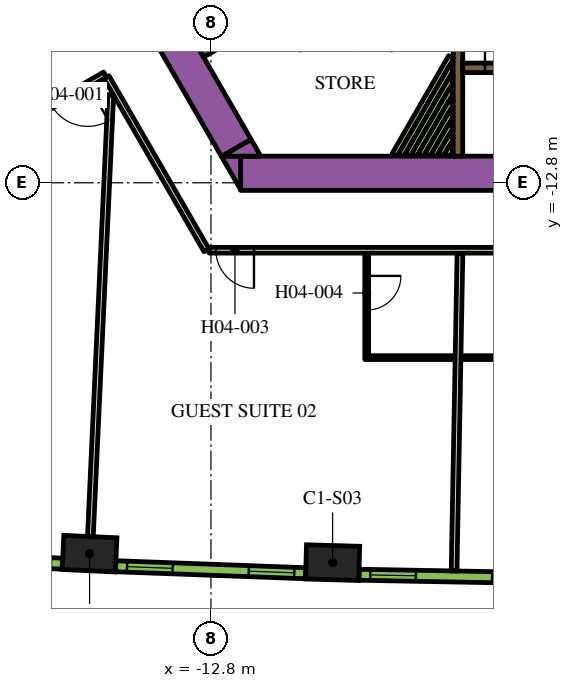
"""IFC4 building model, lengths in metres.
Left out: names, types, materials, properties, quantities, classifications, styles, units other than length and angle.
Written with IfcOpenShell. Run it as: python <this file> out.ifc"""

import sys

from ifc_helpers import new_model, si_unit, direction, frame, frame_2d, origin, origin_2d, place, context, subcontext, project, spatial, polyline, rectangle, outline, extrude, element, fill, save


model = new_model("IFC4")
c1 = context("Model", 3, precision=1e-05, world=origin(), true_north=direction((0.0, 1.0)))
c2 = subcontext(c1, "Body", "Model", "MODEL_VIEW")
j1 = project(units=[si_unit("LENGTHUNIT", "METRE"), si_unit("PLANEANGLEUNIT", "RADIAN")], contexts=[c1])
p1 = place(None, origin())
s1 = spatial("IfcSite", under=j1, at=p1, CompositionType="ELEMENT")
p2 = place(p1, origin())
s2 = spatial("IfcBuilding", under=s1, at=p2, CompositionType="ELEMENT")
p3 = place(p2, frame((0.0, 0.0, 66.6)))
s3 = spatial("IfcBuildingStorey", under=s2, at=p3, CompositionType="ELEMENT", Elevation=66.6)
for number, where, z_axis, x_axis in (
    (1, (-15.994, -22.558, 0.0), (0.0, 0.0, 1.0), (0.999, -0.046, 0.0)),
    (2, (-9.599, -22.795, 0.0), (0.0, 0.0, 1.0), (1.0, -0.028, 0.0)),
):
    element("IfcColumn", number, at=place(p3, frame(where, z_axis=z_axis, x_axis=x_axis)), inside=s3, PredefinedType="COLUMN", context=c2, shape_type="SweptSolid", body=[
        extrude(rectangle(XDim=1.4, YDim=0.9, at=origin_2d()), origin(), (0.0, 0.0, 1.0), 3.9),
    ])
p4 = place(p3, frame((-12.019, -12.55, 0.0), z_axis=(0.0, 0.0, 1.0), x_axis=(1.0, 0.0, 0.0)))
e3 = element("IfcWall", 3, at=p4, inside=s3, PredefinedType="SOLIDWALL", context=c2, shape_type="SweptSolid", body=[
    extrude(rectangle(XDim=21.63, YDim=0.9, at=frame_2d((10.815, 0.0))), origin(), (0.0, 0.0, 1.0), 3.9),
])
p5 = place(p3, origin())
e4 = element("IfcWall", 4, at=p5, inside=s3, PredefinedType="SOLIDWALL", context=c2, shape_type="SweptSolid", body=[
    extrude(outline(polyline([(-12.529, -12.1), (-12.021, -12.1), (-12.021, -12.98), (-12.529, -12.1)])), origin(), (0.0, 0.0, 1.0), 3.9),
])
p6 = place(p3, frame((-12.134, -11.883, 0.0), z_axis=(0.0, 0.0, 1.0), x_axis=(-0.500005339912, 0.866022320763, 0.0)))
e5 = element("IfcWall", 5, at=p6, inside=s3, PredefinedType="SOLIDWALL", context=c2, shape_type="SweptSolid", body=[
    extrude(rectangle(XDim=9.488, YDim=0.9, at=frame_2d((4.744, 0.0))), origin(), (0.0, 0.0, 1.0), 3.9),
])
e6 = element("IfcWall", 6, at=p5, inside=s3, PredefinedType="SOLIDWALL", context=c2, shape_type="SweptSolid", body=[
    extrude(outline(polyline([(-11.489, -12.1), (-12.505, -12.1), (-11.743, -11.66), (-11.489, -12.1)])), origin(), (0.0, 0.0, 1.0), 3.9),
])
p7 = place(p3, frame((-12.885, -9.431, 0.0), z_axis=(0.0, 0.0, 1.0), x_axis=(-0.500020560727, 0.866013532718, 0.0)))
e7 = element("IfcWall", 7, at=p7, inside=s3, PredefinedType="SOLIDWALL", context=c2, shape_type="SweptSolid", body=[
    extrude(rectangle(XDim=3.45, YDim=0.25, at=frame_2d((1.725, 0.0))), origin(), (0.0, 0.0, 1.0), 3.9),
])
p8 = place(p3, frame((-12.84, -9.261, 0.0), z_axis=(0.0, 0.0, 1.0), x_axis=(0.866016039709, 0.500016218704, 0.0)))
e8 = element("IfcWall", 8, at=p8, inside=s3, PredefinedType="SOLIDWALL", context=c2, shape_type="SweptSolid", body=[
    extrude(rectangle(XDim=7.05, YDim=0.25, at=frame_2d((3.525, 0.0))), origin(), (0.0, 0.0, 1.0), 3.9),
])
p9 = place(p3, frame((-6.3, -12.1, 0.0), z_axis=(0.0, 0.0, 1.0), x_axis=(0.0, 1.0, 0.0)))
e9 = element("IfcWall", 9, at=p9, inside=s3, PredefinedType="SOLIDWALL", context=c2, shape_type="SweptSolid", body=[
    extrude(rectangle(XDim=3.265, YDim=0.25, at=frame_2d((1.632, 0.0))), origin(), (0.0, 0.0, 1.0), 3.9),
])
p10 = place(p3, frame((-7.968, -12.068, 0.0), z_axis=(0.0, 0.0, 1.0), x_axis=(0.500013701029, 0.866017493347, 0.0)))
e10 = element("IfcWall", 10, at=p10, inside=s3, PredefinedType="PARTITIONING", context=c2, shape_type="SweptSolid", body=[
    extrude(rectangle(XDim=2.975, YDim=0.15, at=frame_2d((1.488, 0.0))), origin(), (0.0, 0.0, 1.0), 2.75),
])
p11 = place(p3, frame((-7.794, -12.068, 0.0), z_axis=(0.0, 0.0, 1.0), x_axis=(0.499985098601, 0.86603400694, 0.0)))
e11 = element("IfcWall", 11, at=p11, inside=s3, PredefinedType="PARTITIONING", context=c2, shape_type="SweptSolid", body=[
    extrude(rectangle(XDim=2.628, YDim=0.15, at=frame_2d((1.314, 0.0))), origin(), (0.0, 0.0, 1.0), 2.75),
])
p12 = place(p3, frame((-7.621, -12.068, 0.0), z_axis=(0.0, 0.0, 1.0), x_axis=(0.500028047758, 0.866009209798, 0.0)))
e12 = element("IfcWall", 12, at=p12, inside=s3, PredefinedType="PARTITIONING", context=c2, shape_type="SweptSolid", body=[
    extrude(rectangle(XDim=2.282, YDim=0.15, at=frame_2d((1.141, 0.0))), origin(), (0.0, 0.0, 1.0), 2.75),
])
p13 = place(p3, frame((-7.448, -12.068, 0.0), z_axis=(0.0, 0.0, 1.0), x_axis=(0.500031751504, 0.866007071269, 0.0)))
e13 = element("IfcWall", 13, at=p13, inside=s3, PredefinedType="PARTITIONING", context=c2, shape_type="SweptSolid", body=[
    extrude(rectangle(XDim=1.936, YDim=0.15, at=frame_2d((0.968, 0.0))), origin(), (0.0, 0.0, 1.0), 2.75),
])
p14 = place(p3, frame((-7.275, -12.068, 0.0), z_axis=(0.0, 0.0, 1.0), x_axis=(0.499988385283, 0.86603210944, 0.0)))
e14 = element("IfcWall", 14, at=p14, inside=s3, PredefinedType="PARTITIONING", context=c2, shape_type="SweptSolid", body=[
    extrude(rectangle(XDim=1.589, YDim=0.15, at=frame_2d((0.795, 0.0))), origin(), (0.0, 0.0, 1.0), 2.75),
])
p15 = place(p3, frame((-7.102, -12.068, 0.0), z_axis=(0.0, 0.0, 1.0), x_axis=(0.500068153333, 0.865986051864, 0.0)))
e15 = element("IfcWall", 15, at=p15, inside=s3, PredefinedType="PARTITIONING", context=c2, shape_type="SweptSolid", body=[
    extrude(rectangle(XDim=1.243, YDim=0.15, at=frame_2d((0.622, 0.0))), origin(), (0.0, 0.0, 1.0), 2.75),
])
p16 = place(p3, frame((-6.928, -12.068, 0.0), z_axis=(0.0, 0.0, 1.0), x_axis=(0.500005339912, 0.866022320763, 0.0)))
e16 = element("IfcWall", 16, at=p16, inside=s3, PredefinedType="PARTITIONING", context=c2, shape_type="SweptSolid", body=[
    extrude(rectangle(XDim=0.896, YDim=0.15, at=frame_2d((0.448, 0.0))), origin(), (0.0, 0.0, 1.0), 2.75),
])
p17 = place(p3, frame((-6.755, -12.068, 0.0), z_axis=(0.0, 0.0, 1.0), x_axis=(0.500196256984, 0.865912065108, 0.0)))
e17 = element("IfcWall", 17, at=p17, inside=s3, PredefinedType="PARTITIONING", context=c2, shape_type="SweptSolid", body=[
    extrude(rectangle(XDim=0.55, YDim=0.15, at=frame_2d((0.275, 0.0))), origin(), (0.0, 0.0, 1.0), 2.75),
])
p18 = place(p3, frame((-6.582, -12.068, 0.0), z_axis=(0.0, 0.0, 1.0), x_axis=(0.499618727529, 0.866245419672, 0.0)))
e18 = element("IfcWall", 18, at=p18, inside=s3, PredefinedType="PARTITIONING", context=c2, shape_type="SweptSolid", body=[
    extrude(rectangle(XDim=0.204, YDim=0.15, at=frame_2d((0.102, 0.0))), origin(), (0.0, 0.0, 1.0), 2.75),
])
p19 = place(p3, frame((-6.175, -9.775, 0.0), z_axis=(0.0, 0.0, 1.0), x_axis=(1.0, 0.0, 0.0)))
e19 = element("IfcWall", 19, at=p19, inside=s3, PredefinedType="SOLIDWALL", context=c2, shape_type="SweptSolid", body=[
    extrude(rectangle(XDim=12.35, YDim=0.25, at=frame_2d((6.175, 0.0))), origin(), (0.0, 0.0, 1.0), 3.9),
])
p20 = place(p19, frame((0.585, 0.0, 0.0)))
e20 = element("IfcOpeningElement", 20, at=p20, cuts=e19, PredefinedType="OPENING", context=c2, shape_type="SweptSolid", body=[
    extrude(rectangle(XDim=1.1, YDim=2.1, at=frame_2d((0.55, 1.05))), frame((0.0, 0.135, 0.0), z_axis=(0.0, -1.0, 0.0), x_axis=(1.0, 0.0, 0.0)), (0.0, 0.0, 1.0), 0.27),
])
p21 = place(p19, frame((3.105, 0.0, 0.0)))
e21 = element("IfcOpeningElement", 21, at=p21, cuts=e19, PredefinedType="OPENING", context=c2, shape_type="SweptSolid", body=[
    extrude(rectangle(XDim=1.1, YDim=2.1, at=frame_2d((0.55, 1.05))), frame((0.0, 0.135, 0.0), z_axis=(0.0, -1.0, 0.0), x_axis=(1.0, 0.0, 0.0)), (0.0, 0.0, 1.0), 0.27),
])
p22 = place(p19, frame((5.625, 0.0, 0.0)))
e22 = element("IfcOpeningElement", 22, at=p22, cuts=e19, PredefinedType="OPENING", context=c2, shape_type="SweptSolid", body=[
    extrude(rectangle(XDim=1.1, YDim=2.1, at=frame_2d((0.55, 1.05))), frame((0.0, 0.135, 0.0), z_axis=(0.0, -1.0, 0.0), x_axis=(1.0, 0.0, 0.0)), (0.0, 0.0, 1.0), 0.27),
])
p23 = place(p19, frame((8.145, 0.0, 0.0)))
e23 = element("IfcOpeningElement", 23, at=p23, cuts=e19, PredefinedType="OPENING", context=c2, shape_type="SweptSolid", body=[
    extrude(rectangle(XDim=1.1, YDim=2.1, at=frame_2d((0.55, 1.05))), frame((0.0, 0.135, 0.0), z_axis=(0.0, -1.0, 0.0), x_axis=(1.0, 0.0, 0.0)), (0.0, 0.0, 1.0), 0.27),
])
p24 = place(p19, frame((10.665, 0.0, 0.0)))
e24 = element("IfcOpeningElement", 24, at=p24, cuts=e19, PredefinedType="OPENING", context=c2, shape_type="SweptSolid", body=[
    extrude(rectangle(XDim=1.1, YDim=2.1, at=frame_2d((0.55, 1.05))), frame((0.0, 0.135, 0.0), z_axis=(0.0, -1.0, 0.0), x_axis=(1.0, 0.0, 0.0)), (0.0, 0.0, 1.0), 0.27),
])
p25 = place(p3, frame((-30.463, -16.635, 0.0), z_axis=(0.0, 0.0, 1.0), x_axis=(0.866022394896, 0.500005211512, 0.0)))
e25 = element("IfcWall", 25, at=p25, inside=s3, PredefinedType="PARTITIONING", context=c2, shape_type="SweptSolid", body=[
    extrude(rectangle(XDim=16.144, YDim=0.15, at=frame_2d((8.072, 0.0))), origin(), (0.0, 0.0, 1.0), 2.75),
])
p26 = place(p25, frame((11.004, 0.0, 0.0)))
e26 = element("IfcOpeningElement", 26, at=p26, cuts=e25, PredefinedType="OPENING", context=c2, shape_type="SweptSolid", body=[
    extrude(rectangle(XDim=1.0, YDim=2.1, at=frame_2d((0.5, 1.05))), frame((0.0, 0.085, 0.0), z_axis=(0.0, -1.0, 0.0), x_axis=(1.0, 0.0, 0.0)), (0.0, 0.0, 1.0), 0.17),
])
p27 = place(p3, frame((-15.587, -9.952, 0.0), z_axis=(0.0, 0.0, 1.0), x_axis=(-0.866022197818, -0.500005552856, 0.0)))
e27 = element("IfcWall", 27, at=p27, inside=s3, PredefinedType="PARTITIONING", context=c2, shape_type="SweptSolid", body=[
    extrude(rectangle(XDim=16.224, YDim=0.15, at=frame_2d((8.112, 0.0))), origin(), (0.0, 0.0, 1.0), 2.75),
])
p28 = place(p27, frame((0.527, 0.0, 0.0)))
e28 = element("IfcOpeningElement", 28, at=p28, cuts=e27, PredefinedType="OPENING", context=c2, shape_type="SweptSolid", body=[
    extrude(rectangle(XDim=1.1, YDim=2.1, at=frame_2d((0.55, 1.05))), frame((0.0, 0.085, 0.0), z_axis=(0.0, -1.0, 0.0), x_axis=(1.0, 0.0, 0.0)), (0.0, 0.0, 1.0), 0.17),
])
p29 = place(p3, frame((-12.918, -14.575, 0.0), z_axis=(0.0, 0.0, 1.0), x_axis=(-0.500009150678, 0.866020120573, 0.0)))
e29 = element("IfcWall", 29, at=p29, inside=s3, PredefinedType="PARTITIONING", context=c2, shape_type="SweptSolid", body=[
    extrude(rectangle(XDim=5.258, YDim=0.15, at=frame_2d((2.629, 0.0))), origin(), (0.0, 0.0, 1.0), 2.75),
])
p30 = place(p3, frame((12.918, -14.575, 0.0), z_axis=(0.0, 0.0, 1.0), x_axis=(-1.0, 0.0, 0.0)))
e30 = element("IfcWall", 30, at=p30, inside=s3, PredefinedType="PARTITIONING", context=c2, shape_type="SweptSolid", body=[
    extrude(rectangle(XDim=25.766, YDim=0.15, at=frame_2d((12.883, 0.0))), origin(), (0.0, 0.0, 1.0), 2.75),
])
p31 = place(p30, frame((24.586, 0.0, 0.0)))
e31 = element("IfcOpeningElement", 31, at=p31, cuts=e30, PredefinedType="OPENING", context=c2, shape_type="SweptSolid", body=[
    extrude(rectangle(XDim=1.0, YDim=2.1, at=frame_2d((0.5, 1.05))), frame((0.0, 0.085, 0.0), z_axis=(0.0, -1.0, 0.0), x_axis=(1.0, 0.0, 0.0)), (0.0, 0.0, 1.0), 0.17),
])
p32 = place(p30, frame((9.948, 0.0, 0.0)))
e32 = element("IfcOpeningElement", 32, at=p32, cuts=e30, PredefinedType="OPENING", context=c2, shape_type="SweptSolid", body=[
    extrude(rectangle(XDim=1.0, YDim=2.1, at=frame_2d((0.5, 1.05))), frame((0.0, 0.085, 0.0), z_axis=(0.0, -1.0, 0.0), x_axis=(1.0, 0.0, 0.0)), (0.0, 0.0, 1.0), 0.17),
])
p33 = place(p30, frame((8.642, 0.0, 0.0)))
e33 = element("IfcOpeningElement", 33, at=p33, cuts=e30, PredefinedType="OPENING", context=c2, shape_type="SweptSolid", body=[
    extrude(rectangle(XDim=1.0, YDim=2.1, at=frame_2d((0.5, 1.05))), frame((0.0, 0.085, 0.0), z_axis=(0.0, -1.0, 0.0), x_axis=(1.0, 0.0, 0.0)), (0.0, 0.0, 1.0), 0.17),
])
p34 = place(p30, frame((0.18, 0.0, 0.0)))
e34 = element("IfcOpeningElement", 34, at=p34, cuts=e30, PredefinedType="OPENING", context=c2, shape_type="SweptSolid", body=[
    extrude(rectangle(XDim=1.0, YDim=2.1, at=frame_2d((0.5, 1.05))), frame((0.0, 0.085, 0.0), z_axis=(0.0, -1.0, 0.0), x_axis=(1.0, 0.0, 0.0)), (0.0, 0.0, 1.0), 0.17),
])
p35 = place(p3, frame((-15.973, -22.109, 0.0), z_axis=(0.0, 0.0, 1.0), x_axis=(0.046191717129, 0.998932592955, 0.0)))
e35 = element("IfcWall", 35, at=p35, inside=s3, PredefinedType="PARTITIONING", context=c2, shape_type="SweptSolid", body=[
    extrude(rectangle(XDim=11.638, YDim=0.15, at=frame_2d((5.819, 0.0))), origin(), (0.0, 0.0, 1.0), 2.75),
])
p36 = place(p3, frame((-6.402, -23.014, 0.0), z_axis=(0.0, 0.0, 1.0), x_axis=(0.01849587109, 0.999828936745, 0.0)))
e36 = element("IfcWall", 36, at=p36, inside=s3, PredefinedType="PARTITIONING", context=c2, shape_type="SweptSolid", body=[
    extrude(rectangle(XDim=8.355, YDim=0.15, at=frame_2d((4.178, 0.0))), origin(), (0.0, 0.0, 1.0), 2.75),
])
p37 = place(p3, frame((-8.702, -14.65, 0.0), z_axis=(0.0, 0.0, 1.0), x_axis=(0.0, -1.0, 0.0)))
e37 = element("IfcWall", 37, at=p37, inside=s3, PredefinedType="PARTITIONING", context=c2, shape_type="SweptSolid", body=[
    extrude(rectangle(XDim=2.8, YDim=0.1, at=frame_2d((1.4, 0.0))), origin(), (0.0, 0.0, 1.0), 2.75),
])
p38 = place(p37, frame((0.6, 0.0, 0.0)))
e38 = element("IfcOpeningElement", 38, at=p38, cuts=e37, PredefinedType="OPENING", context=c2, shape_type="SweptSolid", body=[
    extrude(rectangle(XDim=0.9, YDim=2.1, at=frame_2d((0.45, 1.05))), frame((0.0, 0.06, 0.0), z_axis=(0.0, -1.0, 0.0), x_axis=(1.0, 0.0, 0.0)), (0.0, 0.0, 1.0), 0.12),
])
p39 = place(p3, frame((-8.652, -17.4, 0.0), z_axis=(0.0, 0.0, 1.0), x_axis=(1.0, 0.0, 0.0)))
e39 = element("IfcWall", 39, at=p39, inside=s3, PredefinedType="PARTITIONING", context=c2, shape_type="SweptSolid", body=[
    extrude(rectangle(XDim=2.27, YDim=0.1, at=frame_2d((1.135, 0.0))), origin(), (0.0, 0.0, 1.0), 2.75),
])
p40 = place(p3, frame((-3.844, -17.4, 0.0), z_axis=(0.0, 0.0, 1.0), x_axis=(-1.0, 0.0, 0.0)))
e40 = element("IfcWall", 40, at=p40, inside=s3, PredefinedType="PARTITIONING", context=c2, shape_type="SweptSolid", body=[
    extrude(rectangle(XDim=2.37, YDim=0.1, at=frame_2d((1.185, 0.0))), origin(), (0.0, 0.0, 1.0), 2.75),
])
p41 = place(p3, frame((-21.701, -22.547, 0.0), z_axis=(0.0, 0.0, 1.0), x_axis=(0.998464708705, -0.055391564976, 0.0)))
e41 = element("IfcWall", 41, at=p41, inside=s3, PredefinedType="SOLIDWALL", context=c2, shape_type="SweptSolid", body=[
    extrude(rectangle(XDim=4.998, YDim=0.29, at=frame_2d((2.499, 0.0))), origin(), (0.0, 0.0, 1.0), 3.65),
])
p42 = place(p41, frame((0.297, 0.0, 0.9)))
e42 = element("IfcOpeningElement", 42, at=p42, cuts=e41, PredefinedType="OPENING", context=c2, shape_type="SweptSolid", body=[
    extrude(rectangle(XDim=1.2, YDim=2.15, at=frame_2d((0.6, 1.075))), frame((0.0, 0.155, 0.0), z_axis=(0.0, -1.0, 0.0), x_axis=(1.0, 0.0, 0.0)), (0.0, 0.0, 1.0), 0.31),
])
p43 = place(p41, frame((3.501, 0.0, 0.9)))
e43 = element("IfcOpeningElement", 43, at=p43, cuts=e41, PredefinedType="OPENING", context=c2, shape_type="SweptSolid", body=[
    extrude(rectangle(XDim=1.2, YDim=2.15, at=frame_2d((0.6, 1.075))), frame((0.0, 0.155, 0.0), z_axis=(0.0, -1.0, 0.0), x_axis=(1.0, 0.0, 0.0)), (0.0, 0.0, 1.0), 0.31),
])
p44 = place(p3, frame((-15.305, -22.889, 0.0), z_axis=(0.0, 0.0, 1.0), x_axis=(0.999317974969, -0.036926750529, 0.0)))
e44 = element("IfcWall", 44, at=p44, inside=s3, PredefinedType="SOLIDWALL", context=c2, shape_type="SweptSolid", body=[
    extrude(rectangle(XDim=4.998, YDim=0.29, at=frame_2d((2.499, 0.0))), origin(), (0.0, 0.0, 1.0), 3.65),
])
p45 = place(p44, frame((0.297, 0.0, 0.9)))
e45 = element("IfcOpeningElement", 45, at=p45, cuts=e44, PredefinedType="OPENING", context=c2, shape_type="SweptSolid", body=[
    extrude(rectangle(XDim=1.2, YDim=2.15, at=frame_2d((0.6, 1.075))), frame((0.0, 0.155, 0.0), z_axis=(0.0, -1.0, 0.0), x_axis=(1.0, 0.0, 0.0)), (0.0, 0.0, 1.0), 0.31),
])
p46 = place(p44, frame((3.501, 0.0, 0.9)))
e46 = element("IfcOpeningElement", 46, at=p46, cuts=e44, PredefinedType="OPENING", context=c2, shape_type="SweptSolid", body=[
    extrude(rectangle(XDim=1.2, YDim=2.15, at=frame_2d((0.6, 1.075))), frame((0.0, 0.155, 0.0), z_axis=(0.0, -1.0, 0.0), x_axis=(1.0, 0.0, 0.0)), (0.0, 0.0, 1.0), 0.31),
])
p47 = place(p3, frame((-8.904, -23.113, 0.0), z_axis=(0.0, 0.0, 1.0), x_axis=(0.999829529479, -0.018463801951, 0.0)))
e47 = element("IfcWall", 47, at=p47, inside=s3, PredefinedType="SOLIDWALL", context=c2, shape_type="SweptSolid", body=[
    extrude(rectangle(XDim=4.998, YDim=0.29, at=frame_2d((2.499, 0.0))), origin(), (0.0, 0.0, 1.0), 3.65),
])
p48 = place(p47, frame((0.297, 0.0, 0.9)))
e48 = element("IfcOpeningElement", 48, at=p48, cuts=e47, PredefinedType="OPENING", context=c2, shape_type="SweptSolid", body=[
    extrude(rectangle(XDim=1.2, YDim=2.15, at=frame_2d((0.6, 1.075))), frame((0.0, 0.155, 0.0), z_axis=(0.0, -1.0, 0.0), x_axis=(1.0, 0.0, 0.0)), (0.0, 0.0, 1.0), 0.31),
])
p49 = place(p47, frame((3.501, 0.0, 0.9)))
e49 = element("IfcOpeningElement", 49, at=p49, cuts=e47, PredefinedType="OPENING", context=c2, shape_type="SweptSolid", body=[
    extrude(rectangle(XDim=1.2, YDim=2.15, at=frame_2d((0.6, 1.075))), frame((0.0, 0.155, 0.0), z_axis=(0.0, -1.0, 0.0), x_axis=(1.0, 0.0, 0.0)), (0.0, 0.0, 1.0), 0.31),
])
p50 = place(p20, origin())
e50 = element("IfcDoor", 50, at=p50, inside=s3, OperationType="DOUBLE_DOOR_SLIDING", PredefinedType="DOOR", context=c2, shape_type="SweptSolid", body=[
    extrude(rectangle(XDim=1.1, YDim=2.1, at=frame_2d((0.55, 1.05))), frame((0.0, 0.025, 0.0), z_axis=(0.0, -1.0, 0.0), x_axis=(1.0, 0.0, 0.0)), (0.0, 0.0, 1.0), 0.05),
])
fill(e20, e50)
p51 = place(p28, origin())
e51 = element("IfcDoor", 51, at=p51, inside=s3, OperationType="SINGLE_SWING_LEFT", PredefinedType="DOOR", context=c2, shape_type="SweptSolid", body=[
    extrude(rectangle(XDim=1.1, YDim=2.1, at=frame_2d((0.55, 1.05))), frame((0.0, 0.025, 0.0), z_axis=(0.0, -1.0, 0.0), x_axis=(1.0, 0.0, 0.0)), (0.0, 0.0, 1.0), 0.05),
])
fill(e28, e51)
p52 = place(p31, origin())
e52 = element("IfcDoor", 52, at=p52, inside=s3, OperationType="SINGLE_SWING_RIGHT", PredefinedType="DOOR", context=c2, shape_type="SweptSolid", body=[
    extrude(rectangle(XDim=1.0, YDim=2.1, at=frame_2d((0.5, 1.05))), frame((0.0, 0.025, 0.0), z_axis=(0.0, -1.0, 0.0), x_axis=(1.0, 0.0, 0.0)), (0.0, 0.0, 1.0), 0.05),
])
fill(e31, e52)
p53 = place(p38, origin())
e53 = element("IfcDoor", 53, at=p53, inside=s3, OperationType="SINGLE_SWING_LEFT", PredefinedType="DOOR", context=c2, shape_type="SweptSolid", body=[
    extrude(rectangle(XDim=0.9, YDim=2.1, at=frame_2d((0.45, 1.05))), frame((0.0, 0.025, 0.0), z_axis=(0.0, -1.0, 0.0), x_axis=(1.0, 0.0, 0.0)), (0.0, 0.0, 1.0), 0.05),
])
fill(e38, e53)
p54 = place(p45, origin())
e54 = element("IfcWindow", 54, at=p54, inside=s3, PartitioningType="DOUBLE_PANEL_VERTICAL", PredefinedType="WINDOW", context=c2, shape_type="SweptSolid", body=[
    extrude(rectangle(XDim=1.2, YDim=2.15, at=frame_2d((0.6, 1.075))), frame((0.0, 0.015, 0.0), z_axis=(0.0, -1.0, 0.0), x_axis=(1.0, 0.0, 0.0)), (0.0, 0.0, 1.0), 0.06),
])
fill(e45, e54)
p55 = place(p46, origin())
e55 = element("IfcWindow", 55, at=p55, inside=s3, PartitioningType="DOUBLE_PANEL_VERTICAL", PredefinedType="WINDOW", context=c2, shape_type="SweptSolid", body=[
    extrude(rectangle(XDim=1.2, YDim=2.15, at=frame_2d((0.6, 1.075))), frame((0.0, 0.015, 0.0), z_axis=(0.0, -1.0, 0.0), x_axis=(1.0, 0.0, 0.0)), (0.0, 0.0, 1.0), 0.06),
])
fill(e46, e55)
p56 = place(p48, origin())
e56 = element("IfcWindow", 56, at=p56, inside=s3, PartitioningType="DOUBLE_PANEL_VERTICAL", PredefinedType="WINDOW", context=c2, shape_type="SweptSolid", body=[
    extrude(rectangle(XDim=1.2, YDim=2.15, at=frame_2d((0.6, 1.075))), frame((0.0, 0.015, 0.0), z_axis=(0.0, -1.0, 0.0), x_axis=(1.0, 0.0, 0.0)), (0.0, 0.0, 1.0), 0.06),
])
fill(e48, e56)
p57 = place(p49, origin())
e57 = element("IfcWindow", 57, at=p57, inside=s3, PartitioningType="DOUBLE_PANEL_VERTICAL", PredefinedType="WINDOW", context=c2, shape_type="SweptSolid", body=[
    extrude(rectangle(XDim=1.2, YDim=2.15, at=frame_2d((0.6, 1.075))), frame((0.0, 0.015, 0.0), z_axis=(0.0, -1.0, 0.0), x_axis=(1.0, 0.0, 0.0)), (0.0, 0.0, 1.0), 0.06),
])
fill(e49, e57)
save(model, sys.argv[1])
